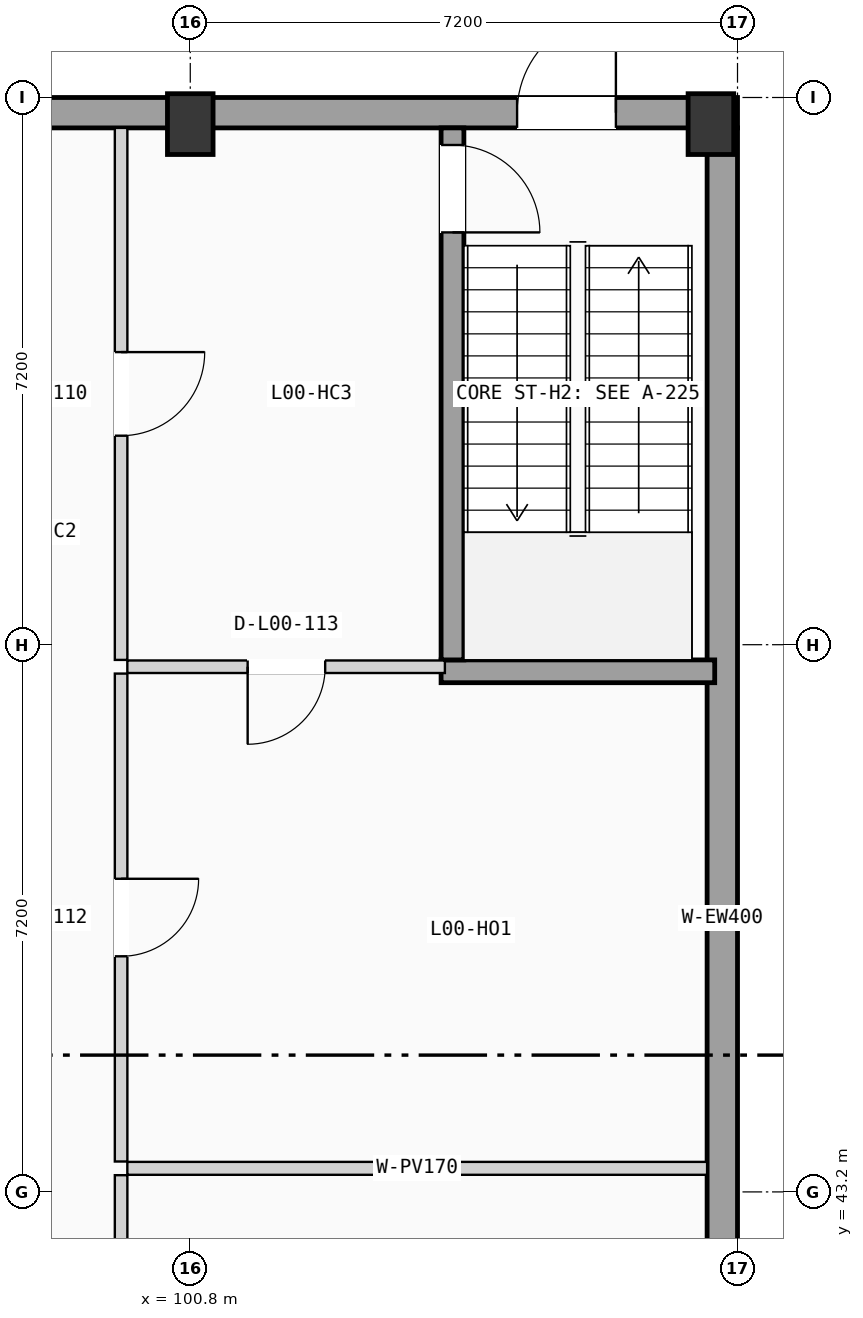
"""IFC4 building model, lengths in metres.
Left out: names, types, materials, properties, quantities, classifications, styles, units other than length and angle.
Written with IfcOpenShell. Run it as: python <this file> out.ifc"""

import sys

from ifc_helpers import new_model, si_unit, direction, frame, frame_2d, origin, origin_2d, place, context, subcontext, project, spatial, rectangle, extrude, element, fill, save


model = new_model("IFC4")
c1 = context("Model", 3, precision=1e-05, world=origin(), true_north=direction((0.0, 1.0)))
c2 = subcontext(c1, "Body", "Model", "MODEL_VIEW")
j1 = project(units=[si_unit("LENGTHUNIT", "METRE"), si_unit("PLANEANGLEUNIT", "RADIAN")], contexts=[c1])
p1 = place(None, origin())
s1 = spatial("IfcSite", under=j1, at=p1, CompositionType="ELEMENT")
p2 = place(p1, origin())
s2 = spatial("IfcBuilding", under=s1, at=p2, CompositionType="ELEMENT")
p3 = place(p2, origin())
s3 = spatial("IfcBuildingStorey", under=s2, at=p3, CompositionType="ELEMENT", Elevation=0.0)
for number, where, z_axis, x_axis in (
    (1, (100.8, 57.25, 0.0), (0.0, 0.0, 1.0), (1.0, 0.0, 0.0)),
    (2, (107.65, 57.25, 0.0), (0.0, 0.0, 1.0), (1.0, 0.0, 0.0)),
):
    element("IfcColumn", number, at=place(p3, frame(where, z_axis=z_axis, x_axis=x_axis)), inside=s3, PredefinedType="COLUMN", context=c2, shape_type="SweptSolid", body=[
        extrude(rectangle(XDim=0.6, YDim=0.8, at=origin_2d()), origin(), (0.0, 0.0, 1.0), 4.9),
    ])
p4 = place(p3, frame((57.6, 57.4, 0.0), z_axis=(0.0, 0.0, 1.0), x_axis=(1.0, 0.0, 0.0)))
e3 = element("IfcWall", 3, at=p4, inside=s3, PredefinedType="SOLIDWALL", context=c2, shape_type="SweptSolid", body=[
    extrude(rectangle(XDim=50.4, YDim=0.4, at=frame_2d((25.2, 0.0))), origin(), (0.0, 0.0, 1.0), 4.63),
])
p5 = place(p4, frame((47.5, 0.0, 0.0)))
e4 = element("IfcOpeningElement", 4, at=p5, cuts=e3, PredefinedType="OPENING", context=c2, shape_type="SweptSolid", body=[
    extrude(rectangle(XDim=1.3, YDim=2.2, at=frame_2d((0.65, 1.1))), frame((0.0, 0.21, 0.0), z_axis=(0.0, -1.0, 0.0), x_axis=(1.0, 0.0, 0.0)), (0.0, 0.0, 1.0), 0.42),
])
p6 = place(p4, frame((24.15, 0.0, 0.0)))
e5 = element("IfcOpeningElement", 5, at=p6, cuts=e3, PredefinedType="OPENING", context=c2, shape_type="SweptSolid", body=[
    extrude(rectangle(XDim=2.1, YDim=2.45, at=frame_2d((1.05, 1.225))), frame((0.0, 0.21, 0.0), z_axis=(0.0, -1.0, 0.0), x_axis=(1.0, 0.0, 0.0)), (0.0, 0.0, 1.0), 0.42),
])
p7 = place(p3, frame((107.8, 36.4, 0.0), z_axis=(0.0, 0.0, 1.0), x_axis=(0.0, 1.0, 0.0)))
e6 = element("IfcWall", 6, at=p7, inside=s3, PredefinedType="SOLIDWALL", context=c2, shape_type="SweptSolid", body=[
    extrude(rectangle(XDim=20.8, YDim=0.4, at=frame_2d((10.4, 0.0))), origin(), (0.0, 0.0, 1.0), 4.63),
])
p8 = place(p3, frame((104.1, 50.05, 0.0), z_axis=(0.0, 0.0, 1.0), x_axis=(1.0, 0.0, 0.0)))
e7 = element("IfcWall", 7, at=p8, inside=s3, PredefinedType="SHEAR", context=c2, shape_type="SweptSolid", body=[
    extrude(rectangle(XDim=3.6, YDim=0.3, at=frame_2d((1.8, 0.0))), origin(), (0.0, 0.0, 1.0), 4.63),
])
p9 = place(p3, frame((104.25, 50.2, 0.0), z_axis=(0.0, 0.0, 1.0), x_axis=(0.0, 1.0, 0.0)))
e8 = element("IfcWall", 8, at=p9, inside=s3, PredefinedType="SHEAR", context=c2, shape_type="SweptSolid", body=[
    extrude(rectangle(XDim=7.0, YDim=0.3, at=frame_2d((3.5, 0.0))), origin(), (0.0, 0.0, 1.0), 4.63),
])
p10 = place(p9, frame((5.625, 0.0, 0.0)))
e9 = element("IfcOpeningElement", 9, at=p10, cuts=e8, PredefinedType="OPENING", context=c2, shape_type="SweptSolid", body=[
    extrude(rectangle(XDim=1.15, YDim=2.12, at=frame_2d((0.575, 1.06))), frame((0.0, 0.16, 0.0), z_axis=(0.0, -1.0, 0.0), x_axis=(1.0, 0.0, 0.0)), (0.0, 0.0, 1.0), 0.32),
])
p11 = place(p3, frame((99.89, 50.2, 0.0), z_axis=(0.0, 0.0, 1.0), x_axis=(0.0, 1.0, 0.0)))
e10 = element("IfcWall", 10, at=p11, inside=s3, PredefinedType="PARTITIONING", context=c2, shape_type="SweptSolid", body=[
    extrude(rectangle(XDim=7.0, YDim=0.165, at=frame_2d((3.5, 0.0))), origin(), (0.0, 0.0, 1.0), 3.84),
])
p12 = place(p11, frame((2.95, 0.0, 0.0)))
e11 = element("IfcOpeningElement", 11, at=p12, cuts=e10, PredefinedType="OPENING", context=c2, shape_type="SweptSolid", body=[
    extrude(rectangle(XDim=1.1, YDim=2.12, at=frame_2d((0.55, 1.06))), frame((0.0, 0.093, 0.0), z_axis=(0.0, -1.0, 0.0), x_axis=(1.0, 0.0, 0.0)), (0.0, 0.0, 1.0), 0.185),
])
p13 = place(p3, frame((99.89, 36.4, 0.0), z_axis=(0.0, 0.0, 1.0), x_axis=(0.0, 1.0, 0.0)))
e12 = element("IfcWall", 12, at=p13, inside=s3, PredefinedType="PARTITIONING", context=c2, shape_type="SweptSolid", body=[
    extrude(rectangle(XDim=7.02, YDim=0.165, at=frame_2d((3.51, 0.0))), origin(), (0.0, 0.0, 1.0), 3.84),
])
p14 = place(p13, frame((3.0, 0.0, 0.0)))
e13 = element("IfcOpeningElement", 13, at=p14, cuts=e12, PredefinedType="OPENING", context=c2, shape_type="SweptSolid", body=[
    extrude(rectangle(XDim=1.02, YDim=2.16, at=frame_2d((0.51, 1.08))), frame((0.0, 0.093, 0.0), z_axis=(0.0, -1.0, 0.0), x_axis=(1.0, 0.0, 0.0)), (0.0, 0.0, 1.0), 0.185),
])
p15 = place(p3, frame((99.89, 43.6, 0.0), z_axis=(0.0, 0.0, 1.0), x_axis=(0.0, 1.0, 0.0)))
e14 = element("IfcWall", 14, at=p15, inside=s3, PredefinedType="PARTITIONING", context=c2, shape_type="SweptSolid", body=[
    extrude(rectangle(XDim=6.42, YDim=0.165, at=frame_2d((3.21, 0.0))), origin(), (0.0, 0.0, 1.0), 3.84),
])
p16 = place(p15, frame((2.7, 0.0, 0.0)))
e15 = element("IfcOpeningElement", 15, at=p16, cuts=e14, PredefinedType="OPENING", context=c2, shape_type="SweptSolid", body=[
    extrude(rectangle(XDim=1.02, YDim=2.16, at=frame_2d((0.51, 1.08))), frame((0.0, 0.093, 0.0), z_axis=(0.0, -1.0, 0.0), x_axis=(1.0, 0.0, 0.0)), (0.0, 0.0, 1.0), 0.185),
])
p17 = place(p3, frame((99.972, 50.11, 0.0), z_axis=(0.0, 0.0, 1.0), x_axis=(1.0, 0.0, 0.0)))
e16 = element("IfcWall", 16, at=p17, inside=s3, PredefinedType="PARTITIONING", context=c2, shape_type="SweptSolid", body=[
    extrude(rectangle(XDim=4.178, YDim=0.165, at=frame_2d((2.089, 0.0))), origin(), (0.0, 0.0, 1.0), 3.84),
])
p18 = place(p17, frame((1.583, 0.0, 0.0)))
e17 = element("IfcOpeningElement", 17, at=p18, cuts=e16, PredefinedType="OPENING", context=c2, shape_type="SweptSolid", body=[
    extrude(rectangle(XDim=1.02, YDim=2.16, at=frame_2d((0.51, 1.08))), frame((0.0, 0.093, 0.0), z_axis=(0.0, -1.0, 0.0), x_axis=(1.0, 0.0, 0.0)), (0.0, 0.0, 1.0), 0.185),
])
p19 = place(p3, frame((99.972, 43.51, 0.0), z_axis=(0.0, 0.0, 1.0), x_axis=(1.0, 0.0, 0.0)))
e18 = element("IfcWall", 18, at=p19, inside=s3, PredefinedType="PARTITIONING", context=c2, shape_type="SweptSolid", body=[
    extrude(rectangle(XDim=7.628, YDim=0.17, at=frame_2d((3.814, 0.0))), origin(), (0.0, 0.0, 1.0), 3.84),
])
p20 = place(p5, origin())
e19 = element("IfcDoor", 19, at=p20, inside=s3, OperationType="SINGLE_SWING_RIGHT", PredefinedType="DOOR", context=c2, shape_type="SweptSolid", body=[
    extrude(rectangle(XDim=1.3, YDim=2.2, at=frame_2d((0.65, 1.1))), frame((0.0, 0.025, 0.0), z_axis=(0.0, -1.0, 0.0), x_axis=(1.0, 0.0, 0.0)), (0.0, 0.0, 1.0), 0.05),
])
fill(e4, e19)
p21 = place(p10, frame((1.15, 0.0, 0.0), z_axis=(0.0, 0.0, 1.0), x_axis=(-1.0, 0.0, 0.0)))
e20 = element("IfcDoor", 20, at=p21, inside=s3, OperationType="SINGLE_SWING_LEFT", PredefinedType="DOOR", context=c2, shape_type="SweptSolid", body=[
    extrude(rectangle(XDim=1.15, YDim=2.12, at=frame_2d((0.575, 1.06))), frame((0.0, 0.025, 0.0), z_axis=(0.0, -1.0, 0.0), x_axis=(1.0, 0.0, 0.0)), (0.0, 0.0, 1.0), 0.05),
])
fill(e9, e20)
p22 = place(p12, frame((1.1, 0.0, 0.0), z_axis=(0.0, 0.0, 1.0), x_axis=(-1.0, 0.0, 0.0)))
e21 = element("IfcDoor", 21, at=p22, inside=s3, OperationType="SINGLE_SWING_RIGHT", PredefinedType="DOOR", context=c2, shape_type="SweptSolid", body=[
    extrude(rectangle(XDim=1.1, YDim=2.12, at=frame_2d((0.55, 1.06))), frame((0.0, 0.025, 0.0), z_axis=(0.0, -1.0, 0.0), x_axis=(1.0, 0.0, 0.0)), (0.0, 0.0, 1.0), 0.05),
])
fill(e11, e21)
p23 = place(p16, frame((1.02, 0.0, 0.0), z_axis=(0.0, 0.0, 1.0), x_axis=(-1.0, 0.0, 0.0)))
e22 = element("IfcDoor", 22, at=p23, inside=s3, OperationType="SINGLE_SWING_RIGHT", PredefinedType="DOOR", context=c2, shape_type="SweptSolid", body=[
    extrude(rectangle(XDim=1.02, YDim=2.16, at=frame_2d((0.51, 1.08))), frame((0.0, 0.025, 0.0), z_axis=(0.0, -1.0, 0.0), x_axis=(1.0, 0.0, 0.0)), (0.0, 0.0, 1.0), 0.05),
])
fill(e15, e22)
p24 = place(p18, frame((1.02, 0.0, 0.0), z_axis=(0.0, 0.0, 1.0), x_axis=(-1.0, 0.0, 0.0)))
e23 = element("IfcDoor", 23, at=p24, inside=s3, OperationType="SINGLE_SWING_LEFT", PredefinedType="DOOR", context=c2, shape_type="SweptSolid", body=[
    extrude(rectangle(XDim=1.02, YDim=2.16, at=frame_2d((0.51, 1.08))), frame((0.0, 0.025, 0.0), z_axis=(0.0, -1.0, 0.0), x_axis=(1.0, 0.0, 0.0)), (0.0, 0.0, 1.0), 0.05),
])
fill(e17, e23)
save(model, sys.argv[1])
